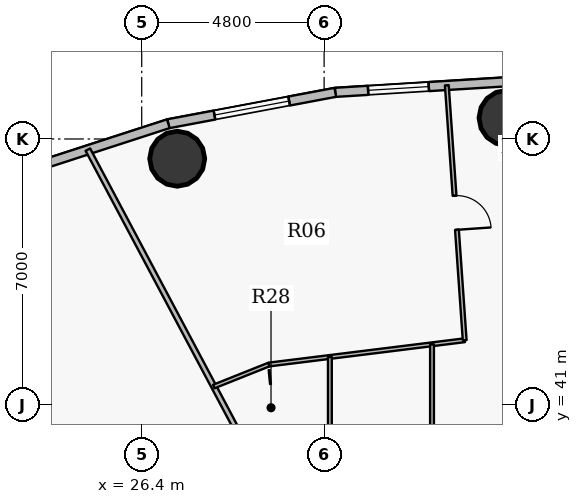
"""IFC4 building model, lengths in metres.
Left out: names, types, materials, properties, quantities, classifications, styles, units other than length and angle.
Written with IfcOpenShell. Run it as: python <this file> out.ifc"""

import sys

from ifc_helpers import new_model, si_unit, direction, frame, frame_2d, origin, origin_2d, place, context, subcontext, project, spatial, rectangle, hollow_circle, extrude, source, transform, mapped, element, fill, save


model = new_model("IFC4")
c1 = context("Model", 3, precision=1e-05, world=origin(), true_north=direction((0.0, 1.0)))
c2 = subcontext(c1, "Body", "Model", "MODEL_VIEW")
j1 = project(units=[si_unit("LENGTHUNIT", "METRE"), si_unit("PLANEANGLEUNIT", "RADIAN")], contexts=[c1])
p1 = place(None, origin())
s1 = spatial("IfcSite", under=j1, at=p1, CompositionType="ELEMENT")
p2 = place(p1, origin())
s2 = spatial("IfcBuilding", under=s1, at=p2, CompositionType="ELEMENT")
p3 = place(p2, frame((0.0, 0.0, 130.95)))
s3 = spatial("IfcBuildingStorey", under=s2, at=p3, CompositionType="ELEMENT", Elevation=130.95)
for number, where, z_axis, x_axis in (
    (1, (36.0, 48.555, 0.0), (0.0, 0.0, 1.0), (1.0, 0.0, 0.0)),
    (2, (27.334, 47.481, 0.0), (0.0, 0.0, 1.0), (1.0, 0.0, 0.0)),
):
    element("IfcColumn", number, at=place(p3, frame(where, z_axis=z_axis, x_axis=x_axis)), inside=s3, PredefinedType="COLUMN", context=c2, shape_type="SweptSolid", body=[
        extrude(hollow_circle(Radius=0.725, WallThickness=0.042, at=origin_2d()), origin(), (0.0, 0.0, 1.0), 3.75),
    ])
p4 = place(p3, frame((31.494, 49.227, 0.0), z_axis=(0.0, 0.0, 1.0), x_axis=(0.998107531589, 0.061492726276, 0.0)))
e3 = element("IfcWall", 3, at=p4, inside=s3, PredefinedType="SOLIDWALL", context=c2, shape_type="SweptSolid", body=[
    extrude(rectangle(XDim=4.514, YDim=0.24, at=frame_2d((2.257, 0.0))), origin(), (0.0, 0.0, 1.0), 3.5),
])
p5 = place(p4, frame((0.865, 0.0, 0.9)))
e4 = element("IfcOpeningElement", 4, at=p5, cuts=e3, PredefinedType="OPENING", context=c2, shape_type="SweptSolid", body=[
    extrude(rectangle(XDim=1.6, YDim=1.75, at=origin_2d()), frame((0.8, 0.13, 0.875), z_axis=(0.0, -1.0, 0.0), x_axis=(1.0, 0.0, 0.0)), (0.0, 0.0, 1.0), 0.26),
])
p6 = place(p3, frame((27.1, 48.401, 0.0), z_axis=(0.0, 0.0, 1.0), x_axis=(0.982789252177, 0.184730305596, 0.0)))
e5 = element("IfcWall", 5, at=p6, inside=s3, PredefinedType="SOLIDWALL", context=c2, shape_type="SweptSolid", body=[
    extrude(rectangle(XDim=4.471, YDim=0.24, at=frame_2d((2.235, 0.0))), origin(), (0.0, 0.0, 1.0), 3.5),
])
p7 = place(p6, frame((1.236, 0.0, 0.9)))
e6 = element("IfcOpeningElement", 6, at=p7, cuts=e5, PredefinedType="OPENING", context=c2, shape_type="SweptSolid", body=[
    extrude(rectangle(XDim=2.0, YDim=1.75, at=origin_2d()), frame((1.0, 0.13, 0.875), z_axis=(0.0, -1.0, 0.0), x_axis=(1.0, 0.0, 0.0)), (0.0, 0.0, 1.0), 0.26),
])
p8 = place(p3, frame((22.926, 47.047, 0.0), z_axis=(0.0, 0.0, 1.0), x_axis=(0.951211346073, 0.308540070495, 0.0)))
e7 = element("IfcWall", 7, at=p8, inside=s3, PredefinedType="SOLIDWALL", context=c2, shape_type="SweptSolid", body=[
    extrude(rectangle(XDim=4.388, YDim=0.24, at=frame_2d((2.194, 0.0))), origin(), (0.0, 0.0, 1.0), 3.5),
])
p9 = place(p3, frame((24.983, 47.72, 0.0), z_axis=(0.0, 0.0, 1.0), x_axis=(0.469467959591, -0.882949508702, 0.0)))
e8 = element("IfcWall", 8, at=p9, inside=s3, PredefinedType="PARTITIONING", context=c2, shape_type="SweptSolid", body=[
    extrude(rectangle(XDim=12.537, YDim=0.135, at=frame_2d((6.269, 0.0))), origin(), (0.0, 0.0, 1.0), 2.935),
])
p10 = place(p3, frame((28.297, 41.487, 0.0), z_axis=(0.0, 0.0, 1.0), x_axis=(0.928778117732, 0.370636220602, 0.0)))
e9 = element("IfcWall", 9, at=p10, inside=s3, PredefinedType="PARTITIONING", context=c2, shape_type="SweptSolid", body=[
    extrude(rectangle(XDim=1.562, YDim=0.1, at=frame_2d((0.781, 0.0))), origin(), (0.0, 0.0, 1.0), 2.935),
])
p11 = place(p3, frame((29.749, 42.066, 0.0), z_axis=(0.0, 0.0, 1.0), x_axis=(0.992399697935, 0.123056245428, 0.0)))
e10 = element("IfcWall", 10, at=p11, inside=s3, PredefinedType="PARTITIONING", context=c2, shape_type="SweptSolid", body=[
    extrude(rectangle(XDim=5.19, YDim=0.1, at=frame_2d((2.595, 0.0))), origin(), (0.0, 0.0, 1.0), 2.935),
])
p12 = place(p3, frame((31.352, 36.65, 0.0), z_axis=(0.0, 0.0, 1.0), x_axis=(0.0, 1.0, 0.0)))
e11 = element("IfcWall", 11, at=p12, inside=s3, PredefinedType="PARTITIONING", context=c2, shape_type="SweptSolid", body=[
    extrude(rectangle(XDim=5.615, YDim=0.1, at=frame_2d((2.807, 0.0))), origin(), (0.0, 0.0, 1.0), 2.935),
])
p13 = place(p12, frame((2.397, 0.0, 0.0)))
e12 = element("IfcOpeningElement", 12, at=p13, cuts=e11, PredefinedType="OPENING", context=c2, shape_type="SweptSolid", body=[
    extrude(rectangle(XDim=0.82, YDim=2.1, at=origin_2d()), frame((0.41, 0.06, 1.05), z_axis=(0.0, -1.0, 0.0), x_axis=(1.0, 0.0, 0.0)), (0.0, 0.0, 1.0), 0.12),
])
p14 = place(p3, frame((34.039, 36.714, 0.0), z_axis=(0.0, 0.0, 1.0), x_axis=(0.0, 1.0, 0.0)))
e13 = element("IfcWall", 13, at=p14, inside=s3, PredefinedType="PARTITIONING", context=c2, shape_type="SweptSolid", body=[
    extrude(rectangle(XDim=5.884, YDim=0.1, at=frame_2d((2.942, 0.0))), origin(), (0.0, 0.0, 1.0), 2.985),
])
p15 = place(p14, frame((2.492, 0.0, 0.0)))
e14 = element("IfcOpeningElement", 14, at=p15, cuts=e13, PredefinedType="OPENING", context=c2, shape_type="SweptSolid", body=[
    extrude(rectangle(XDim=0.9, YDim=2.1, at=origin_2d()), frame((0.45, 0.06, 1.05), z_axis=(0.0, -1.0, 0.0), x_axis=(1.0, 0.0, 0.0)), (0.0, 0.0, 1.0), 0.12),
])
p16 = place(p3, frame((34.429, 49.413, 0.0), z_axis=(0.0, 0.0, 1.0), x_axis=(0.069954481801, -0.99755018444, 0.0)))
e15 = element("IfcWall", 15, at=p16, inside=s3, PredefinedType="PARTITIONING", context=c2, shape_type="SweptSolid", body=[
    extrude(rectangle(XDim=6.725, YDim=0.1, at=frame_2d((3.363, 0.0))), origin(), (0.0, 0.0, 1.0), 2.935),
])
p17 = place(p16, frame((2.913, 0.0, 0.0)))
e16 = element("IfcOpeningElement", 16, at=p17, cuts=e15, PredefinedType="OPENING", context=c2, shape_type="SweptSolid", body=[
    extrude(rectangle(XDim=0.9, YDim=2.1, at=origin_2d()), frame((0.45, 0.06, 1.05), z_axis=(0.0, -1.0, 0.0), x_axis=(1.0, 0.0, 0.0)), (0.0, 0.0, 1.0), 0.12),
])
m1 = source(origin(), c2, "Body", "SweptSolid", [
    extrude(rectangle(XDim=1.6, YDim=1.75, at=origin_2d()), frame((0.8, 0.03, 0.875), z_axis=(0.0, -1.0, 0.0), x_axis=(1.0, 0.0, 0.0)), (0.0, 0.0, 1.0), 0.06),
])
p18 = place(p5, origin())
e17 = element("IfcWindow", 17, at=p18, inside=s3, PartitioningType="DOUBLE_PANEL_VERTICAL", PredefinedType="WINDOW", context=c2, shape_type="MappedRepresentation", body=[
    mapped(m1, transform((0.0, 0.0, 0.0), x_axis=(1.0, 0.0, 0.0), y_axis=(0.0, 1.0, 0.0), z_axis=(0.0, 0.0, 1.0), scale=1.0)),
])
fill(e4, e17)
m2 = source(origin(), c2, "Body", "SweptSolid", [
    extrude(rectangle(XDim=2.0, YDim=1.75, at=origin_2d()), frame((1.0, 0.03, 0.875), z_axis=(0.0, -1.0, 0.0), x_axis=(1.0, 0.0, 0.0)), (0.0, 0.0, 1.0), 0.06),
])
p19 = place(p7, origin())
e18 = element("IfcWindow", 18, at=p19, inside=s3, PartitioningType="DOUBLE_PANEL_VERTICAL", PredefinedType="WINDOW", context=c2, shape_type="MappedRepresentation", body=[
    mapped(m2, transform((0.0, 0.0, 0.0), x_axis=(1.0, 0.0, 0.0), y_axis=(0.0, 1.0, 0.0), z_axis=(0.0, 0.0, 1.0), scale=1.0)),
])
fill(e6, e18)
m3 = source(origin(), c2, "Body", "SweptSolid", [
    extrude(rectangle(XDim=0.9, YDim=2.1, at=origin_2d()), frame((0.45, 0.025, 1.05), z_axis=(0.0, -1.0, 0.0), x_axis=(1.0, 0.0, 0.0)), (0.0, 0.0, 1.0), 0.05),
])
p20 = place(p17, origin())
e19 = element("IfcDoor", 19, at=p20, inside=s3, OperationType="SINGLE_SWING_RIGHT", PredefinedType="DOOR", context=c2, shape_type="MappedRepresentation", body=[
    mapped(m3, transform((0.0, 0.0, 0.0), x_axis=(1.0, 0.0, 0.0), y_axis=(0.0, 1.0, 0.0), z_axis=(0.0, 0.0, 1.0), scale=1.0)),
])
fill(e16, e19)
save(model, sys.argv[1])
